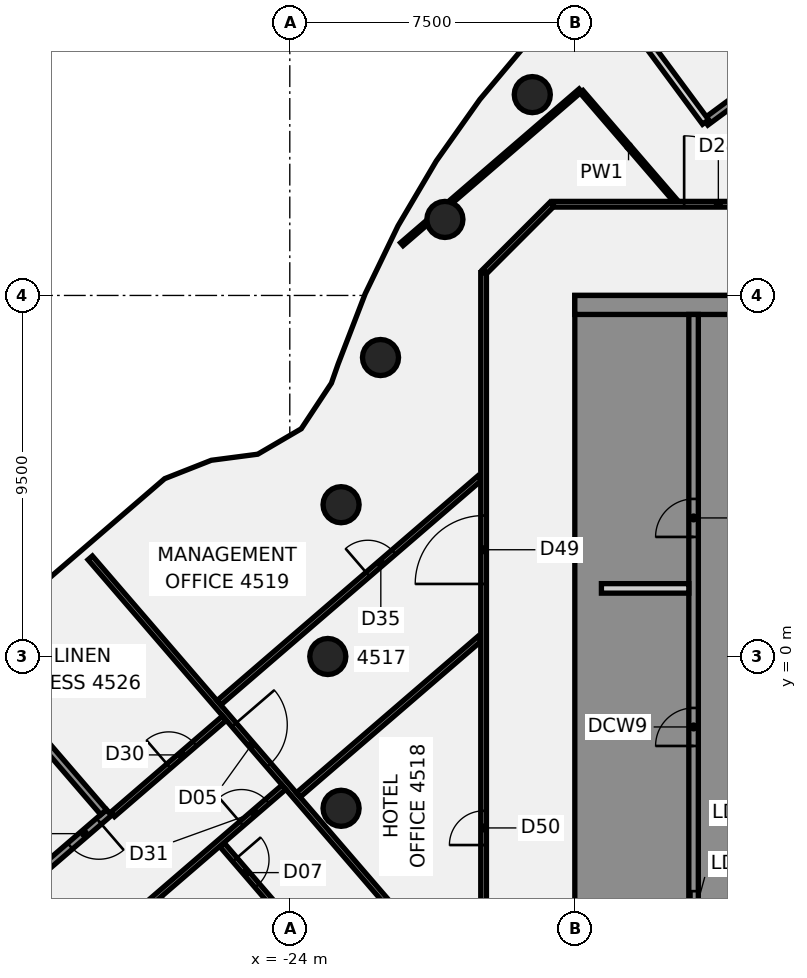
"""IFC4 building model, lengths in metres.
Left out: names, types, materials, properties, quantities, classifications, styles, units other than length and angle.
Written with IfcOpenShell. Run it as: python <this file> out.ifc"""

import sys

from ifc_helpers import new_model, si_unit, direction, frame, frame_2d, origin, origin_2d, place, context, subcontext, project, spatial, polyline, rectangle, circle, outline, extrude, element, fill, save


model = new_model("IFC4")
c1 = context("Model", 3, precision=1e-05, world=origin(), true_north=direction((0.0, 1.0)))
c2 = subcontext(c1, "Body", "Model", "MODEL_VIEW")
j1 = project(units=[si_unit("LENGTHUNIT", "METRE"), si_unit("PLANEANGLEUNIT", "RADIAN")], contexts=[c1])
p1 = place(None, origin())
s1 = spatial("IfcSite", under=j1, at=p1, CompositionType="ELEMENT")
p2 = place(p1, origin())
s2 = spatial("IfcBuilding", under=s1, at=p2, CompositionType="ELEMENT")
p3 = place(p2, frame((0.0, 0.0, 182.5)))
s3 = spatial("IfcBuildingStorey", under=s2, at=p3, CompositionType="ELEMENT", Elevation=182.5)
for number, where, z_axis, x_axis in (
    (1, (-17.619, 14.784, -0.14), (0.0, 0.0, 1.0), (1.0, 0.0, 0.0)),
    (2, (-19.919, 11.5, -0.14), (0.0, 0.0, 1.0), (1.0, 0.0, 0.0)),
    (3, (-21.613, 7.866, -0.14), (0.0, 0.0, 1.0), (1.0, 0.0, 0.0)),
    (4, (-22.651, 3.994, -0.14), (0.0, 0.0, 1.0), (1.0, 0.0, 0.0)),
    (5, (-23.0, 0.0, -0.14), (0.0, 0.0, 1.0), (1.0, 0.0, 0.0)),
    (6, (-22.651, -3.994, -0.14), (0.0, 0.0, 1.0), (1.0, 0.0, 0.0)),
):
    element("IfcColumn", number, at=place(p3, frame(where, z_axis=z_axis, x_axis=x_axis)), inside=s3, PredefinedType="COLUMN", context=c2, shape_type="SweptSolid", body=[
        extrude(circle(Radius=0.475, at=origin_2d()), origin(), (0.0, 0.0, 1.0), 3.6),
    ])
p4 = place(p3, frame((-29.251, 2.595, 0.0), z_axis=(0.0, 0.0, 1.0), x_axis=(0.652713725704, -0.757604641141, 0.0)))
e7 = element("IfcWall", 7, at=p4, inside=s3, PredefinedType="PARTITIONING", context=c2, shape_type="SweptSolid", body=[
    extrude(rectangle(XDim=14.219, YDim=0.15, at=frame_2d((7.109, 0.0))), origin(), (0.0, 0.0, 1.0), 2.864),
])
p5 = place(p4, frame((5.799, 0.0, 0.0)))
e8 = element("IfcOpeningElement", 8, at=p5, cuts=e7, PredefinedType="OPENING", context=c2, shape_type="SweptSolid", body=[
    extrude(rectangle(XDim=1.4, YDim=2.1, at=frame_2d((0.7, 1.05))), frame((0.0, 0.085, 0.0), z_axis=(0.0, -1.0, 0.0), x_axis=(1.0, 0.0, 0.0)), (0.0, 0.0, 1.0), 0.17),
])
p6 = place(p3, frame((-27.453, -6.388, 0.0), z_axis=(0.0, 0.0, 1.0), x_axis=(0.652892175674, -0.757450861075, 0.0)))
e9 = element("IfcWall", 9, at=p6, inside=s3, PredefinedType="PARTITIONING", context=c2, shape_type="SweptSolid", body=[
    extrude(rectangle(XDim=3.766, YDim=0.15, at=frame_2d((1.883, 0.0))), origin(), (0.0, 0.0, 1.0), 2.864),
])
p7 = place(p3, frame((-25.786, -4.952, 0.0), z_axis=(0.0, 0.0, 1.0), x_axis=(0.652886276294, -0.757455946063, 0.0)))
e10 = element("IfcWall", 10, at=p7, inside=s3, PredefinedType="PARTITIONING", context=c2, shape_type="SweptSolid", body=[
    extrude(rectangle(XDim=2.444, YDim=0.15, at=frame_2d((1.222, 0.0))), origin(), (0.0, 0.0, 1.0), 2.864),
])
p8 = place(p7, frame((0.52, 0.0, 0.0)))
e11 = element("IfcOpeningElement", 11, at=p8, cuts=e10, PredefinedType="OPENING", context=c2, shape_type="SweptSolid", body=[
    extrude(rectangle(XDim=0.9, YDim=2.1, at=frame_2d((0.45, 1.05))), frame((0.0, 0.085, 0.0), z_axis=(0.0, -1.0, 0.0), x_axis=(1.0, 0.0, 0.0)), (0.0, 0.0, 1.0), 0.17),
])
p9 = place(p3, frame((-16.321, 14.858, 0.0), z_axis=(0.0, 0.0, 1.0), x_axis=(0.652675414557, -0.757637646393, 0.0)))
e12 = element("IfcWall", 12, at=p9, inside=s3, PredefinedType="PARTITIONING", context=c2, shape_type="SweptSolid", body=[
    extrude(rectangle(XDim=3.784, YDim=0.1, at=frame_2d((1.892, 0.0))), origin(), (0.0, 0.0, 1.0), 2.864),
])
p10 = place(p3, frame((-17.065, 11.9, 0.0), z_axis=(0.0, 0.0, 1.0), x_axis=(1.0, 0.0, 0.0)))
e13 = element("IfcWall", 13, at=p10, inside=s3, PredefinedType="PARTITIONING", context=c2, shape_type="SweptSolid", body=[
    extrude(rectangle(XDim=34.165, YDim=0.15, at=frame_2d((17.083, 0.0))), origin(), (0.0, 0.0, 1.0), 2.864),
])
p11 = place(p10, frame((24.555, 0.0, 0.0)))
e14 = element("IfcOpeningElement", 14, at=p11, cuts=e13, PredefinedType="OPENING", context=c2, shape_type="SweptSolid", body=[
    extrude(rectangle(XDim=1.8, YDim=2.1, at=frame_2d((0.9, 1.05))), frame((0.0, 0.085, 0.0), z_axis=(0.0, -1.0, 0.0), x_axis=(1.0, 0.0, 0.0)), (0.0, 0.0, 1.0), 0.17),
])
p12 = place(p10, frame((8.542, 0.0, 0.0)))
e15 = element("IfcOpeningElement", 15, at=p12, cuts=e13, PredefinedType="OPENING", context=c2, shape_type="SweptSolid", body=[
    extrude(rectangle(XDim=1.8, YDim=2.1, at=frame_2d((0.9, 1.05))), frame((0.0, 0.085, 0.0), z_axis=(0.0, -1.0, 0.0), x_axis=(1.0, 0.0, 0.0)), (0.0, 0.0, 1.0), 0.17),
])
p13 = place(p10, frame((3.442, 0.0, 0.0)))
e16 = element("IfcOpeningElement", 16, at=p13, cuts=e13, PredefinedType="OPENING", context=c2, shape_type="SweptSolid", body=[
    extrude(rectangle(XDim=1.8, YDim=2.1, at=frame_2d((0.9, 1.05))), frame((0.0, 0.085, 0.0), z_axis=(0.0, -1.0, 0.0), x_axis=(1.0, 0.0, 0.0)), (0.0, 0.0, 1.0), 0.17),
])
p14 = place(p3, frame((-28.663, -4.156, 0.0), z_axis=(0.0, 0.0, 1.0), x_axis=(0.757628792985, 0.652685691615, 0.0)))
e17 = element("IfcWall", 17, at=p14, inside=s3, PredefinedType="PARTITIONING", context=c2, shape_type="SweptSolid", body=[
    extrude(rectangle(XDim=3.88, YDim=0.15, at=frame_2d((1.94, 0.0))), origin(), (0.0, 0.0, 1.0), 2.864),
])
p15 = place(p14, frame((1.95, 0.0, 0.0)))
e18 = element("IfcOpeningElement", 18, at=p15, cuts=e17, PredefinedType="OPENING", context=c2, shape_type="SweptSolid", body=[
    extrude(rectangle(XDim=0.9, YDim=2.1, at=frame_2d((0.45, 1.05))), frame((0.0, 0.085, 0.0), z_axis=(0.0, -1.0, 0.0), x_axis=(1.0, 0.0, 0.0)), (0.0, 0.0, 1.0), 0.17),
])
p16 = place(p3, frame((-37.671, -15.086, 0.0), z_axis=(0.0, 0.0, 1.0), x_axis=(0.757564439781, 0.652760384505, 0.0)))
e19 = element("IfcWall", 19, at=p16, inside=s3, PredefinedType="PARTITIONING", context=c2, shape_type="SweptSolid", body=[
    extrude(rectangle(XDim=17.839, YDim=0.15, at=frame_2d((8.92, 0.0))), origin(), (0.0, 0.0, 1.0), 2.864),
])
p17 = place(p16, frame((16.369, 0.0, 0.0)))
e20 = element("IfcOpeningElement", 20, at=p17, cuts=e19, PredefinedType="OPENING", context=c2, shape_type="SweptSolid", body=[
    extrude(rectangle(XDim=0.9, YDim=2.1, at=frame_2d((0.45, 1.05))), frame((0.0, 0.085, 0.0), z_axis=(0.0, -1.0, 0.0), x_axis=(1.0, 0.0, 0.0)), (0.0, 0.0, 1.0), 0.17),
])
p18 = place(p16, frame((9.819, 0.0, 0.0)))
e21 = element("IfcOpeningElement", 21, at=p18, cuts=e19, PredefinedType="OPENING", context=c2, shape_type="SweptSolid", body=[
    extrude(rectangle(XDim=0.9, YDim=2.1, at=frame_2d((0.45, 1.05))), frame((0.0, 0.085, 0.0), z_axis=(0.0, -1.0, 0.0), x_axis=(1.0, 0.0, 0.0)), (0.0, 0.0, 1.0), 0.17),
])
p19 = place(p16, frame((7.52, 0.0, 0.0)))
e22 = element("IfcOpeningElement", 22, at=p19, cuts=e19, PredefinedType="OPENING", context=c2, shape_type="SweptSolid", body=[
    extrude(rectangle(XDim=0.9, YDim=2.1, at=frame_2d((0.45, 1.05))), frame((0.0, 0.085, 0.0), z_axis=(0.0, -1.0, 0.0), x_axis=(1.0, 0.0, 0.0)), (0.0, 0.0, 1.0), 0.17),
])
p20 = place(p16, frame((0.82, 0.0, 0.0)))
e23 = element("IfcOpeningElement", 23, at=p20, cuts=e19, PredefinedType="OPENING", context=c2, shape_type="SweptSolid", body=[
    extrude(rectangle(XDim=0.9, YDim=2.1, at=frame_2d((0.45, 1.05))), frame((0.0, 0.085, 0.0), z_axis=(0.0, -1.0, 0.0), x_axis=(1.0, 0.0, 0.0)), (0.0, 0.0, 1.0), 0.17),
])
p21 = place(p3, frame((-25.862, -1.216, 0.0), z_axis=(0.0, 0.0, 1.0), x_axis=(0.757576468923, 0.652746423762, 0.0)))
e24 = element("IfcWall", 24, at=p21, inside=s3, PredefinedType="PARTITIONING", context=c2, shape_type="SweptSolid", body=[
    extrude(rectangle(XDim=9.05, YDim=0.15, at=frame_2d((4.525, 0.0))), origin(), (0.0, 0.0, 1.0), 2.864),
])
p22 = place(p21, frame((5.17, 0.0, 0.0)))
e25 = element("IfcOpeningElement", 25, at=p22, cuts=e24, PredefinedType="OPENING", context=c2, shape_type="SweptSolid", body=[
    extrude(rectangle(XDim=0.9, YDim=2.1, at=frame_2d((0.45, 1.05))), frame((0.0, 0.085, 0.0), z_axis=(0.0, -1.0, 0.0), x_axis=(1.0, 0.0, 0.0)), (0.0, 0.0, 1.0), 0.17),
])
p23 = place(p3, frame((-23.774, -3.641, 0.0), z_axis=(0.0, 0.0, 1.0), x_axis=(0.757583902186, 0.65273779663, 0.0)))
e26 = element("IfcWall", 26, at=p23, inside=s3, PredefinedType="PARTITIONING", context=c2, shape_type="SweptSolid", body=[
    extrude(rectangle(XDim=6.294, YDim=0.15, at=frame_2d((3.147, 0.0))), origin(), (0.0, 0.0, 1.0), 2.864),
])
p24 = place(p3, frame((-21.052, 10.849, 0.0), z_axis=(0.0, 0.0, 1.0), x_axis=(0.757749789009, 0.652545214722, 0.0)))
e27 = element("IfcWall", 27, at=p24, inside=s3, PredefinedType="PARTITIONING", context=c2, shape_type="SweptSolid", body=[
    extrude(rectangle(XDim=0.882, YDim=0.1, at=frame_2d((0.441, 0.0))), origin(), (0.0, 0.0, 1.0), 2.864),
])
p25 = place(p3, frame((-19.777, 11.947, 0.0), z_axis=(0.0, 0.0, 1.0), x_axis=(0.757625544508, 0.652689462386, 0.0)))
e28 = element("IfcWall", 28, at=p25, inside=s3, PredefinedType="PARTITIONING", context=c2, shape_type="SweptSolid", body=[
    extrude(rectangle(XDim=4.518, YDim=0.1, at=frame_2d((2.259, 0.0))), origin(), (0.0, 0.0, 1.0), 2.864),
])
p26 = place(p3, frame((-18.872, 10.128, 0.0), z_axis=(0.0, 0.0, 1.0), x_axis=(0.707106781187, 0.707106781187, 0.0)))
e29 = element("IfcWall", 29, at=p26, inside=s3, PredefinedType="PARTITIONING", context=c2, shape_type="SweptSolid", body=[
    extrude(rectangle(XDim=2.505, YDim=0.15, at=frame_2d((1.253, 0.0))), origin(), (0.0, 0.0, 1.0), 2.864),
])
p27 = place(p3, frame((-18.9, -10.1, 0.0), z_axis=(0.0, 0.0, 1.0), x_axis=(0.0, 1.0, 0.0)))
e30 = element("IfcWall", 30, at=p27, inside=s3, PredefinedType="PARTITIONING", context=c2, shape_type="SweptSolid", body=[
    extrude(rectangle(XDim=20.2, YDim=0.15, at=frame_2d((10.1, 0.0))), origin(), (0.0, 0.0, 1.0), 2.864),
])
p28 = place(p27, frame((12.009, 0.0, 0.0)))
e31 = element("IfcOpeningElement", 31, at=p28, cuts=e30, PredefinedType="OPENING", context=c2, shape_type="SweptSolid", body=[
    extrude(rectangle(XDim=1.8, YDim=2.1, at=frame_2d((0.9, 1.05))), frame((0.0, 0.085, 0.0), z_axis=(0.0, -1.0, 0.0), x_axis=(1.0, 0.0, 0.0)), (0.0, 0.0, 1.0), 0.17),
])
p29 = place(p27, frame((5.139, 0.0, 0.0)))
e32 = element("IfcOpeningElement", 32, at=p29, cuts=e30, PredefinedType="OPENING", context=c2, shape_type="SweptSolid", body=[
    extrude(rectangle(XDim=0.9, YDim=2.1, at=frame_2d((0.45, 1.05))), frame((0.0, 0.085, 0.0), z_axis=(0.0, -1.0, 0.0), x_axis=(1.0, 0.0, 0.0)), (0.0, 0.0, 1.0), 0.17),
])
p30 = place(p3, frame((-9.639, 16.593, 0.0), z_axis=(0.0, 0.0, 1.0), x_axis=(-0.804072359199, -0.594531446748, 0.0)))
e33 = element("IfcWall", 33, at=p30, inside=s3, PredefinedType="SOLIDWALL", context=c2, shape_type="SweptSolid", body=[
    extrude(rectangle(XDim=4.254, YDim=0.2, at=frame_2d((2.127, 0.0))), origin(), (0.0, 0.0, 1.0), 2.964),
])
p31 = place(p30, frame((1.227, 0.0, 0.0)))
e34 = element("IfcOpeningElement", 34, at=p31, cuts=e33, PredefinedType="OPENING", context=c2, shape_type="SweptSolid", body=[
    extrude(rectangle(XDim=1.8, YDim=2.4, at=frame_2d((0.9, 1.2))), frame((0.0, 0.11, 0.0), z_axis=(0.0, -1.0, 0.0), x_axis=(1.0, 0.0, 0.0)), (0.0, 0.0, 1.0), 0.22),
])
p32 = place(p3, frame((-13.059, 14.064, 0.0), z_axis=(0.0, 0.0, 1.0), x_axis=(-0.594539645469, 0.804066296996, 0.0)))
e35 = element("IfcWall", 35, at=p32, inside=s3, PredefinedType="SOLIDWALL", context=c2, shape_type="SweptSolid", body=[
    extrude(rectangle(XDim=4.712, YDim=0.2, at=frame_2d((2.356, 0.0))), origin(), (0.0, 0.0, 1.0), 3.46),
])
p33 = place(p3, origin())
e36 = element("IfcWall", 36, at=p33, inside=s3, PredefinedType="SHEAR", context=c2, shape_type="SweptSolid", body=[
    extrude(outline(polyline([(-13.5, -8.125), (-16.0, -8.125), (-16.0, -5.625), (-13.5, -5.625), (-13.5, -5.375), (-16.0, -5.375), (-16.0, 5.375), (-13.5, 5.375), (-13.5, 5.625), (-16.0, 5.625), (-16.0, 8.125), (-13.5, 8.125), (-13.5, 9.0), (-16.0, 9.0), (-16.5, 9.0), (-16.5, -9.0), (-16.0, -9.0), (-13.5, -9.0), (-13.5, -8.125)])), origin(), (0.0, 0.0, 1.0), 3.46),
])
p34 = place(p3, frame((-16.5, 9.25, 0.0), z_axis=(0.0, 0.0, 1.0), x_axis=(1.0, 0.0, 0.0)))
e37 = element("IfcWall", 37, at=p34, inside=s3, PredefinedType="SHEAR", context=c2, shape_type="SweptSolid", body=[
    extrude(rectangle(XDim=13.0, YDim=0.5, at=frame_2d((6.5, 0.0))), origin(), (0.0, 0.0, 1.0), 3.46),
])
p35 = place(p3, frame((-13.375, -9.0, 0.0), z_axis=(0.0, 0.0, 1.0), x_axis=(0.0, 1.0, 0.0)))
e38 = element("IfcWall", 38, at=p35, inside=s3, PredefinedType="SHEAR", context=c2, shape_type="SweptSolid", body=[
    extrude(rectangle(XDim=18.0, YDim=0.25, at=frame_2d((9.0, 0.0))), origin(), (0.0, 0.0, 1.0), 3.46),
])
p36 = place(p35, frame((1.425, 0.0, 0.0)))
e39 = element("IfcOpeningElement", 39, at=p36, cuts=e38, PredefinedType="OPENING", context=c2, shape_type="SweptSolid", body=[
    extrude(rectangle(XDim=1.4, YDim=2.1, at=frame_2d((0.7, 1.05))), frame((0.0, 0.135, 0.0), z_axis=(0.0, -1.0, 0.0), x_axis=(1.0, 0.0, 0.0)), (0.0, 0.0, 1.0), 0.27),
])
p37 = place(p35, frame((6.646, 0.0, 0.0)))
e40 = element("IfcOpeningElement", 40, at=p37, cuts=e38, PredefinedType="OPENING", context=c2, shape_type="SweptSolid", body=[
    extrude(rectangle(XDim=1.0, YDim=2.1, at=frame_2d((0.5, 1.05))), frame((0.0, 0.135, 0.0), z_axis=(0.0, -1.0, 0.0), x_axis=(1.0, 0.0, 0.0)), (0.0, 0.0, 1.0), 0.27),
])
p38 = place(p35, frame((12.146, 0.0, 0.0)))
e41 = element("IfcOpeningElement", 41, at=p38, cuts=e38, PredefinedType="OPENING", context=c2, shape_type="SweptSolid", body=[
    extrude(rectangle(XDim=1.0, YDim=2.1, at=frame_2d((0.5, 1.05))), frame((0.0, 0.135, 0.0), z_axis=(0.0, -1.0, 0.0), x_axis=(1.0, 0.0, 0.0)), (0.0, 0.0, 1.0), 0.27),
])
p39 = place(p3, frame((-15.8, 1.792, 0.0), z_axis=(0.0, 0.0, 1.0), x_axis=(1.0, 0.0, 0.0)))
e42 = element("IfcWall", 42, at=p39, inside=s3, PredefinedType="PARTITIONING", context=c2, shape_type="SweptSolid", body=[
    extrude(rectangle(XDim=2.3, YDim=0.25, at=frame_2d((1.15, 0.0))), origin(), (0.0, 0.0, 1.0), 3.46),
])
p40 = place(p3, frame((-28.758, -4.106, -0.14), z_axis=(0.0, 0.0, 1.0), x_axis=(-0.757613125952, -0.652703877257, 0.0)))
e43 = element("IfcWall", 43, at=p40, inside=s3, PredefinedType="SHEAR", context=c2, shape_type="SweptSolid", body=[
    extrude(rectangle(XDim=6.7, YDim=0.2, at=frame_2d((3.35, 0.0))), origin(), (0.0, 0.0, 1.0), 3.004),
])
p41 = place(p40, frame((0.35, 0.0, 0.0)))
e44 = element("IfcOpeningElement", 44, at=p41, cuts=e43, PredefinedType="OPENING", context=c2, shape_type="SweptSolid", body=[
    extrude(rectangle(XDim=1.0, YDim=2.1, at=frame_2d((0.5, 1.05))), frame((0.0, 0.11, 0.0), z_axis=(0.0, -1.0, 0.0), x_axis=(1.0, 0.0, 0.0)), (0.0, 0.0, 1.0), 0.22),
])
p42 = place(p3, frame((-30.988, -1.672, -0.14), z_axis=(0.0, 0.0, 1.0), x_axis=(0.652749445371, -0.75757386542, 0.0)))
e45 = element("IfcWall", 45, at=p42, inside=s3, PredefinedType="SHEAR", context=c2, shape_type="SweptSolid", body=[
    extrude(rectangle(XDim=3.2, YDim=0.2, at=frame_2d((1.6, 0.0))), origin(), (0.0, 0.0, 1.0), 3.004),
])
p43 = place(p5, origin())
e46 = element("IfcDoor", 46, at=p43, inside=s3, OperationType="DOUBLE_DOOR_SINGLE_SWING", PredefinedType="DOOR", context=c2, shape_type="SweptSolid", body=[
    extrude(rectangle(XDim=1.4, YDim=2.1, at=frame_2d((0.7, 1.05))), frame((0.0, 0.025, 0.0), z_axis=(0.0, -1.0, 0.0), x_axis=(1.0, 0.0, 0.0)), (0.0, 0.0, 1.0), 0.05),
])
fill(e8, e46)
p44 = place(p8, frame((0.9, 0.0, 0.0), z_axis=(0.0, 0.0, 1.0), x_axis=(-1.0, 0.0, 0.0)))
e47 = element("IfcDoor", 47, at=p44, inside=s3, OperationType="SINGLE_SWING_LEFT", PredefinedType="DOOR", context=c2, shape_type="SweptSolid", body=[
    extrude(rectangle(XDim=0.9, YDim=2.1, at=frame_2d((0.45, 1.05))), frame((0.0, 0.025, 0.0), z_axis=(0.0, -1.0, 0.0), x_axis=(1.0, 0.0, 0.0)), (0.0, 0.0, 1.0), 0.05),
])
fill(e11, e47)
p45 = place(p13, origin())
e48 = element("IfcDoor", 48, at=p45, inside=s3, OperationType="DOUBLE_DOOR_SINGLE_SWING", PredefinedType="DOOR", context=c2, shape_type="SweptSolid", body=[
    extrude(rectangle(XDim=1.8, YDim=2.1, at=frame_2d((0.9, 1.05))), frame((0.0, 0.025, 0.0), z_axis=(0.0, -1.0, 0.0), x_axis=(1.0, 0.0, 0.0)), (0.0, 0.0, 1.0), 0.05),
])
fill(e16, e48)
p46 = place(p15, origin())
e49 = element("IfcDoor", 49, at=p46, inside=s3, OperationType="SINGLE_SWING_LEFT", PredefinedType="DOOR", context=c2, shape_type="SweptSolid", body=[
    extrude(rectangle(XDim=0.9, YDim=2.1, at=frame_2d((0.45, 1.05))), frame((0.0, 0.025, 0.0), z_axis=(0.0, -1.0, 0.0), x_axis=(1.0, 0.0, 0.0)), (0.0, 0.0, 1.0), 0.05),
])
fill(e18, e49)
p47 = place(p17, frame((0.9, 0.0, 0.0), z_axis=(0.0, 0.0, 1.0), x_axis=(-1.0, 0.0, 0.0)))
e50 = element("IfcDoor", 50, at=p47, inside=s3, OperationType="SINGLE_SWING_RIGHT", PredefinedType="DOOR", context=c2, shape_type="SweptSolid", body=[
    extrude(rectangle(XDim=0.9, YDim=2.1, at=frame_2d((0.45, 1.05))), frame((0.0, 0.025, 0.0), z_axis=(0.0, -1.0, 0.0), x_axis=(1.0, 0.0, 0.0)), (0.0, 0.0, 1.0), 0.05),
])
fill(e20, e50)
p48 = place(p22, origin())
e51 = element("IfcDoor", 51, at=p48, inside=s3, OperationType="SINGLE_SWING_LEFT", PredefinedType="DOOR", context=c2, shape_type="SweptSolid", body=[
    extrude(rectangle(XDim=0.9, YDim=2.1, at=frame_2d((0.45, 1.05))), frame((0.0, 0.025, 0.0), z_axis=(0.0, -1.0, 0.0), x_axis=(1.0, 0.0, 0.0)), (0.0, 0.0, 1.0), 0.05),
])
fill(e25, e51)
p49 = place(p28, frame((1.8, 0.0, 0.0), z_axis=(0.0, 0.0, 1.0), x_axis=(-1.0, 0.0, 0.0)))
e52 = element("IfcDoor", 52, at=p49, inside=s3, OperationType="DOUBLE_DOOR_SINGLE_SWING", PredefinedType="DOOR", context=c2, shape_type="SweptSolid", body=[
    extrude(rectangle(XDim=1.8, YDim=2.1, at=frame_2d((0.9, 1.05))), frame((0.0, 0.025, 0.0), z_axis=(0.0, -1.0, 0.0), x_axis=(1.0, 0.0, 0.0)), (0.0, 0.0, 1.0), 0.05),
])
fill(e31, e52)
p50 = place(p29, origin())
e53 = element("IfcDoor", 53, at=p50, inside=s3, OperationType="SINGLE_SWING_RIGHT", PredefinedType="DOOR", context=c2, shape_type="SweptSolid", body=[
    extrude(rectangle(XDim=0.9, YDim=2.1, at=frame_2d((0.45, 1.05))), frame((0.0, 0.025, 0.0), z_axis=(0.0, -1.0, 0.0), x_axis=(1.0, 0.0, 0.0)), (0.0, 0.0, 1.0), 0.05),
])
fill(e32, e53)
p51 = place(p36, origin())
e54 = element("IfcDoor", 54, at=p51, inside=s3, OperationType="SLIDING_TO_LEFT", PredefinedType="DOOR", context=c2, shape_type="SweptSolid", body=[
    extrude(rectangle(XDim=1.4, YDim=2.1, at=frame_2d((0.7, 1.05))), frame((0.0, 0.025, 0.0), z_axis=(0.0, -1.0, 0.0), x_axis=(1.0, 0.0, 0.0)), (0.0, 0.0, 1.0), 0.05),
])
fill(e39, e54)
p52 = place(p37, origin())
e55 = element("IfcDoor", 55, at=p52, inside=s3, OperationType="SINGLE_SWING_LEFT", PredefinedType="DOOR", context=c2, shape_type="SweptSolid", body=[
    extrude(rectangle(XDim=1.0, YDim=2.1, at=frame_2d((0.5, 1.05))), frame((0.0, 0.025, 0.0), z_axis=(0.0, -1.0, 0.0), x_axis=(1.0, 0.0, 0.0)), (0.0, 0.0, 1.0), 0.05),
])
fill(e40, e55)
p53 = place(p38, origin())
e56 = element("IfcDoor", 56, at=p53, inside=s3, OperationType="SINGLE_SWING_LEFT", PredefinedType="DOOR", context=c2, shape_type="SweptSolid", body=[
    extrude(rectangle(XDim=1.0, YDim=2.1, at=frame_2d((0.5, 1.05))), frame((0.0, 0.025, 0.0), z_axis=(0.0, -1.0, 0.0), x_axis=(1.0, 0.0, 0.0)), (0.0, 0.0, 1.0), 0.05),
])
fill(e41, e56)
p54 = place(p41, origin())
e57 = element("IfcDoor", 57, at=p54, inside=s3, OperationType="SINGLE_SWING_LEFT", PredefinedType="DOOR", context=c2, shape_type="SweptSolid", body=[
    extrude(rectangle(XDim=1.0, YDim=2.1, at=frame_2d((0.5, 1.05))), frame((0.0, 0.025, 0.0), z_axis=(0.0, -1.0, 0.0), x_axis=(1.0, 0.0, 0.0)), (0.0, 0.0, 1.0), 0.05),
])
fill(e44, e57)
save(model, sys.argv[1])
